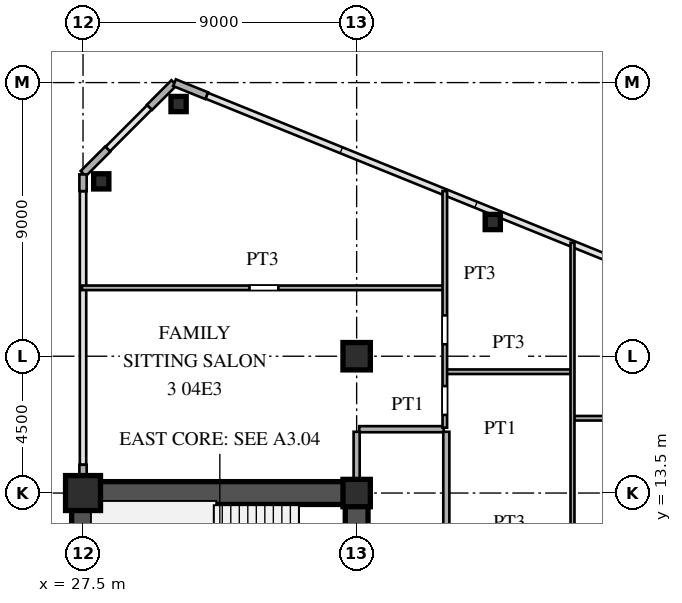
"""IFC4 building model, lengths in metres.
Left out: names, types, materials, properties, quantities, classifications, styles, units other than length and angle.
Written with IfcOpenShell. Run it as: python <this file> out.ifc"""

import sys

from ifc_helpers import new_model, si_unit, direction, frame, frame_2d, origin, origin_2d, place, context, subcontext, project, spatial, rectangle, hollow_rectangle, i_section, extrude, source, transform, mapped, element, save


model = new_model("IFC4")
c1 = context("Model", 3, precision=1e-05, world=origin(), true_north=direction((0.0, 1.0)))
c2 = subcontext(c1, "Body", "Model", "MODEL_VIEW")
j1 = project(units=[si_unit("LENGTHUNIT", "METRE"), si_unit("PLANEANGLEUNIT", "RADIAN")], contexts=[c1])
p1 = place(None, origin())
s1 = spatial("IfcSite", under=j1, at=p1, CompositionType="ELEMENT")
p2 = place(p1, origin())
s2 = spatial("IfcBuilding", under=s1, at=p2, CompositionType="ELEMENT")
p3 = place(p2, frame((0.0, 0.0, 18.9)))
s3 = spatial("IfcBuildingStorey", under=s2, at=p3, CompositionType="ELEMENT", Elevation=18.9)
m1 = source(origin(), c2, "Body", "SweptSolid", [
    extrude(hollow_rectangle(XDim=1.15, YDim=1.15, WallThickness=0.048, at=origin_2d()), origin(), (0.0, 0.0, 1.0), 3.6),
])
p4 = place(p3, frame((27.5, 13.5, 0.0), z_axis=(0.0, 0.0, 1.0), x_axis=(1.0, 0.0, 0.0)))
e1 = element("IfcColumn", 1, at=p4, inside=s3, PredefinedType="COLUMN", context=c2, shape_type="MappedRepresentation", body=[
    mapped(m1, transform((0.0, 0.0, 0.0), scale=1.0)),
])
m2 = source(origin(), c2, "Body", "SweptSolid", [
    extrude(i_section(OverallWidth=0.9, OverallDepth=0.9, WebThickness=0.036, FlangeThickness=0.055, at=origin_2d()), origin(), (0.0, 0.0, 1.0), 3.6),
])
for number, where, z_axis, x_axis in (
    (2, (36.5, 13.5, 0.0), (0.0, 0.0, 1.0), (1.0, 0.0, 0.0)),
    (3, (36.5, 18.0, 0.0), (0.0, 0.0, 1.0), (1.0, 0.0, 0.0)),
):
    element("IfcColumn", number, at=place(p3, frame(where, z_axis=z_axis, x_axis=x_axis)), inside=s3, PredefinedType="COLUMN", context=c2, shape_type="MappedRepresentation", body=[
        mapped(m2, transform((0.0, 0.0, 0.0), scale=1.0)),
    ])
m3 = source(origin(), c2, "Body", "SweptSolid", [
    extrude(hollow_rectangle(XDim=0.5, YDim=0.5, WallThickness=0.02, at=origin_2d()), origin(), (0.0, 0.0, 1.0), 3.6),
])
for number, where, z_axis, x_axis in (
    (4, (30.643, 26.295, 0.0), (0.0, 0.0, 1.0), (1.0, 0.0, 0.0)),
    (5, (28.1, 23.751, 0.0), (0.0, 0.0, 1.0), (1.0, 0.0, 0.0)),
    (6, (40.977, 22.414, 0.0), (0.0, 0.0, 1.0), (1.0, 0.0, 0.0)),
):
    element("IfcColumn", number, at=place(p3, frame(where, z_axis=z_axis, x_axis=x_axis)), inside=s3, PredefinedType="COLUMN", context=c2, shape_type="MappedRepresentation", body=[
        mapped(m3, transform((0.0, 0.0, 0.0), scale=1.0)),
    ])
p5 = place(p3, frame((31.566, 26.569, 0.0), z_axis=(0.0, 0.0, 1.0), x_axis=(-0.927007103665, 0.375043770452, 0.0)))
e7 = element("IfcWall", 7, at=p5, inside=s3, PredefinedType="SOLIDWALL", context=c2, shape_type="SweptSolid", body=[
    extrude(rectangle(XDim=1.14, YDim=0.24, at=frame_2d((0.57, 0.0))), origin(), (0.0, 0.0, 1.0), 3.38),
])
for number, where, z_axis, x_axis in (
    (8, (30.493, 26.993, 0.0), (0.0, 0.0, 1.0), (-0.707, -0.707, 0.0)),
    (9, (28.313, 24.813, 0.0), (0.0, 0.0, 1.0), (-0.707, -0.707, 0.0)),
):
    element("IfcWall", number, at=place(p3, frame(where, z_axis=z_axis, x_axis=x_axis)), inside=s3, PredefinedType="SOLIDWALL", context=c2, shape_type="SweptSolid", body=[
        extrude(rectangle(XDim=1.14, YDim=0.24, at=frame_2d((0.57, 0.0))), origin(), (0.0, 0.0, 1.0), 3.38),
    ])
p6 = place(p3, frame((27.5, 13.88, 0.0), z_axis=(0.0, 0.0, 1.0), x_axis=(0.0, 1.0, 0.0)))
e10 = element("IfcWall", 10, at=p6, inside=s3, PredefinedType="SOLIDWALL", context=c2, shape_type="SweptSolid", body=[
    extrude(rectangle(XDim=0.55, YDim=0.24, at=frame_2d((0.275, 0.0))), origin(), (0.0, 0.0, 1.0), 2.88),
])
p7 = place(p3, frame((27.5, 23.43, 0.0), z_axis=(0.0, 0.0, 1.0), x_axis=(0.0, 1.0, 0.0)))
e11 = element("IfcWall", 11, at=p7, inside=s3, PredefinedType="SOLIDWALL", context=c2, shape_type="SweptSolid", body=[
    extrude(rectangle(XDim=0.55, YDim=0.24, at=frame_2d((0.275, 0.0))), origin(), (0.0, 0.0, 1.0), 3.38),
])
p8 = place(p3, frame((27.5, 1.3, 0.0), z_axis=(0.0, 0.0, 1.0), x_axis=(0.0, 1.0, 0.0)))
e12 = element("IfcWall", 12, at=p8, inside=s3, PredefinedType="SHEAR", context=c2, shape_type="SweptSolid", body=[
    extrude(rectangle(XDim=12.2, YDim=0.75, at=frame_2d((6.1, 0.0))), origin(), (0.0, 0.0, 1.0), 3.38),
])
p9 = place(p3, frame((27.5, 13.5, 0.0), z_axis=(0.0, 0.0, 1.0), x_axis=(1.0, 0.0, 0.0)))
e13 = element("IfcWall", 13, at=p9, inside=s3, PredefinedType="SHEAR", context=c2, shape_type="SweptSolid", body=[
    extrude(rectangle(XDim=9.0, YDim=0.75, at=frame_2d((4.5, 0.0))), origin(), (0.0, 0.0, 1.0), 3.38),
])
p10 = place(p3, frame((36.5, 8.2, 0.0), z_axis=(0.0, 0.0, 1.0), x_axis=(0.0, 1.0, 0.0)))
e14 = element("IfcWall", 14, at=p10, inside=s3, PredefinedType="SHEAR", context=c2, shape_type="SweptSolid", body=[
    extrude(rectangle(XDim=5.45, YDim=0.75, at=frame_2d((2.725, 0.0))), origin(), (0.0, 0.0, 1.0), 3.38),
])
p11 = place(p10, frame((0.245, 0.0, 0.0)))
e15 = element("IfcOpeningElement", 15, at=p11, cuts=e14, PredefinedType="OPENING", context=c2, shape_type="SweptSolid", body=[
    extrude(rectangle(XDim=0.95, YDim=2.15, at=frame_2d((0.475, 1.075))), frame((0.0, 0.385, 0.0), z_axis=(0.0, -1.0, 0.0), x_axis=(1.0, 0.0, 0.0)), (0.0, 0.0, 1.0), 0.77),
])
p12 = place(p3, frame((36.585, 15.6, 0.0), z_axis=(0.0, 0.0, 1.0), x_axis=(1.0, 0.0, 0.0)))
e16 = element("IfcWall", 16, at=p12, inside=s3, PredefinedType="PARTITIONING", context=c2, shape_type="SweptSolid", body=[
    extrude(rectangle(XDim=2.78, YDim=0.2, at=frame_2d((1.39, 0.0))), origin(), (0.0, 0.0, 1.0), 3.38),
])
p13 = place(p3, frame((43.65, 15.96, 0.0), z_axis=(0.0, 0.0, 1.0), x_axis=(1.0, 0.0, 0.0)))
e17 = element("IfcWall", 17, at=p13, inside=s3, PredefinedType="PARTITIONING", context=c2, shape_type="SweptSolid", body=[
    extrude(rectangle(XDim=10.8, YDim=0.15, at=frame_2d((5.4, 0.0))), origin(), (0.0, 0.0, 1.0), 3.38),
])
p14 = place(p13, frame((7.65, 0.0, 0.0)))
e18 = element("IfcOpeningElement", 18, at=p14, cuts=e17, PredefinedType="OPENING", context=c2, shape_type="SweptSolid", body=[
    extrude(rectangle(XDim=0.95, YDim=2.15, at=frame_2d((0.475, 1.075))), frame((0.0, 0.085, 0.0), z_axis=(0.0, -1.0, 0.0), x_axis=(1.0, 0.0, 0.0)), (0.0, 0.0, 1.0), 0.17),
])
p15 = place(p3, frame((39.45, 17.49, 0.0), z_axis=(0.0, 0.0, 1.0), x_axis=(1.0, 0.0, 0.0)))
e19 = element("IfcWall", 19, at=p15, inside=s3, PredefinedType="PARTITIONING", context=c2, shape_type="SweptSolid", body=[
    extrude(rectangle(XDim=4.1, YDim=0.15, at=frame_2d((2.05, 0.0))), origin(), (0.0, 0.0, 1.0), 3.38),
])
p16 = place(p3, frame((27.465, 20.25, 0.0), z_axis=(0.0, 0.0, 1.0), x_axis=(1.0, 0.0, 0.0)))
e20 = element("IfcWall", 20, at=p16, inside=s3, PredefinedType="PARTITIONING", context=c2, shape_type="SweptSolid", body=[
    extrude(rectangle(XDim=11.885, YDim=0.15, at=frame_2d((5.942, 0.0))), origin(), (0.0, 0.0, 1.0), 3.38),
])
p17 = place(p16, frame((5.51, 0.0, 0.0)))
e21 = element("IfcOpeningElement", 21, at=p17, cuts=e20, PredefinedType="OPENING", context=c2, shape_type="SweptSolid", body=[
    extrude(rectangle(XDim=0.95, YDim=2.15, at=frame_2d((0.475, 1.075))), frame((0.0, 0.085, 0.0), z_axis=(0.0, -1.0, 0.0), x_axis=(1.0, 0.0, 0.0)), (0.0, 0.0, 1.0), 0.17),
])
p18 = place(p3, frame((36.5, 13.88, 0.0), z_axis=(0.0, 0.0, 1.0), x_axis=(0.0, 1.0, 0.0)))
e22 = element("IfcWall", 22, at=p18, inside=s3, PredefinedType="PARTITIONING", context=c2, shape_type="SweptSolid", body=[
    extrude(rectangle(XDim=1.635, YDim=0.2, at=frame_2d((0.817, 0.0))), origin(), (0.0, 0.0, 1.0), 2.68),
])
p19 = place(p3, frame((39.4, 15.65, 0.0), z_axis=(0.0, 0.0, 1.0), x_axis=(0.0, 1.0, 0.0)))
e23 = element("IfcWall", 23, at=p19, inside=s3, PredefinedType="PARTITIONING", context=c2, shape_type="SweptSolid", body=[
    extrude(rectangle(XDim=7.783, YDim=0.15, at=frame_2d((3.892, 0.0))), origin(), (0.0, 0.0, 1.0), 3.38),
])
p20 = place(p19, frame((0.419, 0.0, 0.0)))
e24 = element("IfcOpeningElement", 24, at=p20, cuts=e23, PredefinedType="OPENING", context=c2, shape_type="SweptSolid", body=[
    extrude(rectangle(XDim=0.95, YDim=2.15, at=frame_2d((0.475, 1.075))), frame((0.0, 0.085, 0.0), z_axis=(0.0, -1.0, 0.0), x_axis=(1.0, 0.0, 0.0)), (0.0, 0.0, 1.0), 0.17),
])
p21 = place(p19, frame((2.744, 0.0, 0.0)))
e25 = element("IfcOpeningElement", 25, at=p21, cuts=e23, PredefinedType="OPENING", context=c2, shape_type="SweptSolid", body=[
    extrude(rectangle(XDim=0.95, YDim=2.15, at=frame_2d((0.475, 1.075))), frame((0.0, 0.085, 0.0), z_axis=(0.0, -1.0, 0.0), x_axis=(1.0, 0.0, 0.0)), (0.0, 0.0, 1.0), 0.17),
])
p22 = place(p3, frame((39.45, -15.515, 0.0), z_axis=(0.0, 0.0, 1.0), x_axis=(0.0, 1.0, 0.0)))
e26 = element("IfcWall", 26, at=p22, inside=s3, PredefinedType="PARTITIONING", context=c2, shape_type="SweptSolid", body=[
    extrude(rectangle(XDim=31.03, YDim=0.2, at=frame_2d((15.515, 0.0))), origin(), (0.0, 0.0, 1.0), 3.38),
])
p23 = place(p22, frame((1.345, 0.0, 0.0)))
e27 = element("IfcOpeningElement", 27, at=p23, cuts=e26, PredefinedType="OPENING", context=c2, shape_type="SweptSolid", body=[
    extrude(rectangle(XDim=1.05, YDim=2.25, at=frame_2d((0.525, 1.125))), frame((0.0, 0.11, 0.0), z_axis=(0.0, -1.0, 0.0), x_axis=(1.0, 0.0, 0.0)), (0.0, 0.0, 1.0), 0.22),
])
p24 = place(p22, frame((12.28, 0.0, 0.0)))
e28 = element("IfcOpeningElement", 28, at=p24, cuts=e26, PredefinedType="OPENING", context=c2, shape_type="SweptSolid", body=[
    extrude(rectangle(XDim=1.05, YDim=2.25, at=frame_2d((0.525, 1.125))), frame((0.0, 0.11, 0.0), z_axis=(0.0, -1.0, 0.0), x_axis=(1.0, 0.0, 0.0)), (0.0, 0.0, 1.0), 0.22),
])
p25 = place(p22, frame((25.067, 0.0, 0.0)))
e29 = element("IfcOpeningElement", 29, at=p25, cuts=e26, PredefinedType="OPENING", context=c2, shape_type="SweptSolid", body=[
    extrude(rectangle(XDim=1.05, YDim=2.25, at=frame_2d((0.525, 1.125))), frame((0.0, 0.11, 0.0), z_axis=(0.0, -1.0, 0.0), x_axis=(1.0, 0.0, 0.0)), (0.0, 0.0, 1.0), 0.22),
])
p26 = place(p3, frame((43.6, 0.352, 0.0), z_axis=(0.0, 0.0, 1.0), x_axis=(0.0, 1.0, 0.0)))
e30 = element("IfcWall", 30, at=p26, inside=s3, PredefinedType="PARTITIONING", context=c2, shape_type="SweptSolid", body=[
    extrude(rectangle(XDim=21.381, YDim=0.13, at=frame_2d((10.69, 0.0))), origin(), (0.0, 0.0, 1.0), 3.38),
])
p27 = place(p26, frame((8.578, 0.0, 0.0)))
e31 = element("IfcOpeningElement", 31, at=p27, cuts=e30, PredefinedType="OPENING", context=c2, shape_type="SweptSolid", body=[
    extrude(rectangle(XDim=0.95, YDim=2.15, at=frame_2d((0.475, 1.075))), frame((0.0, 0.075, 0.0), z_axis=(0.0, -1.0, 0.0), x_axis=(1.0, 0.0, 0.0)), (0.0, 0.0, 1.0), 0.15),
])
p28 = place(p26, frame((10.078, 0.0, 0.0)))
e32 = element("IfcOpeningElement", 32, at=p28, cuts=e30, PredefinedType="OPENING", context=c2, shape_type="SweptSolid", body=[
    extrude(rectangle(XDim=0.95, YDim=2.15, at=frame_2d((0.475, 1.075))), frame((0.0, 0.075, 0.0), z_axis=(0.0, -1.0, 0.0), x_axis=(1.0, 0.0, 0.0)), (0.0, 0.0, 1.0), 0.15),
])
save(model, sys.argv[1])
